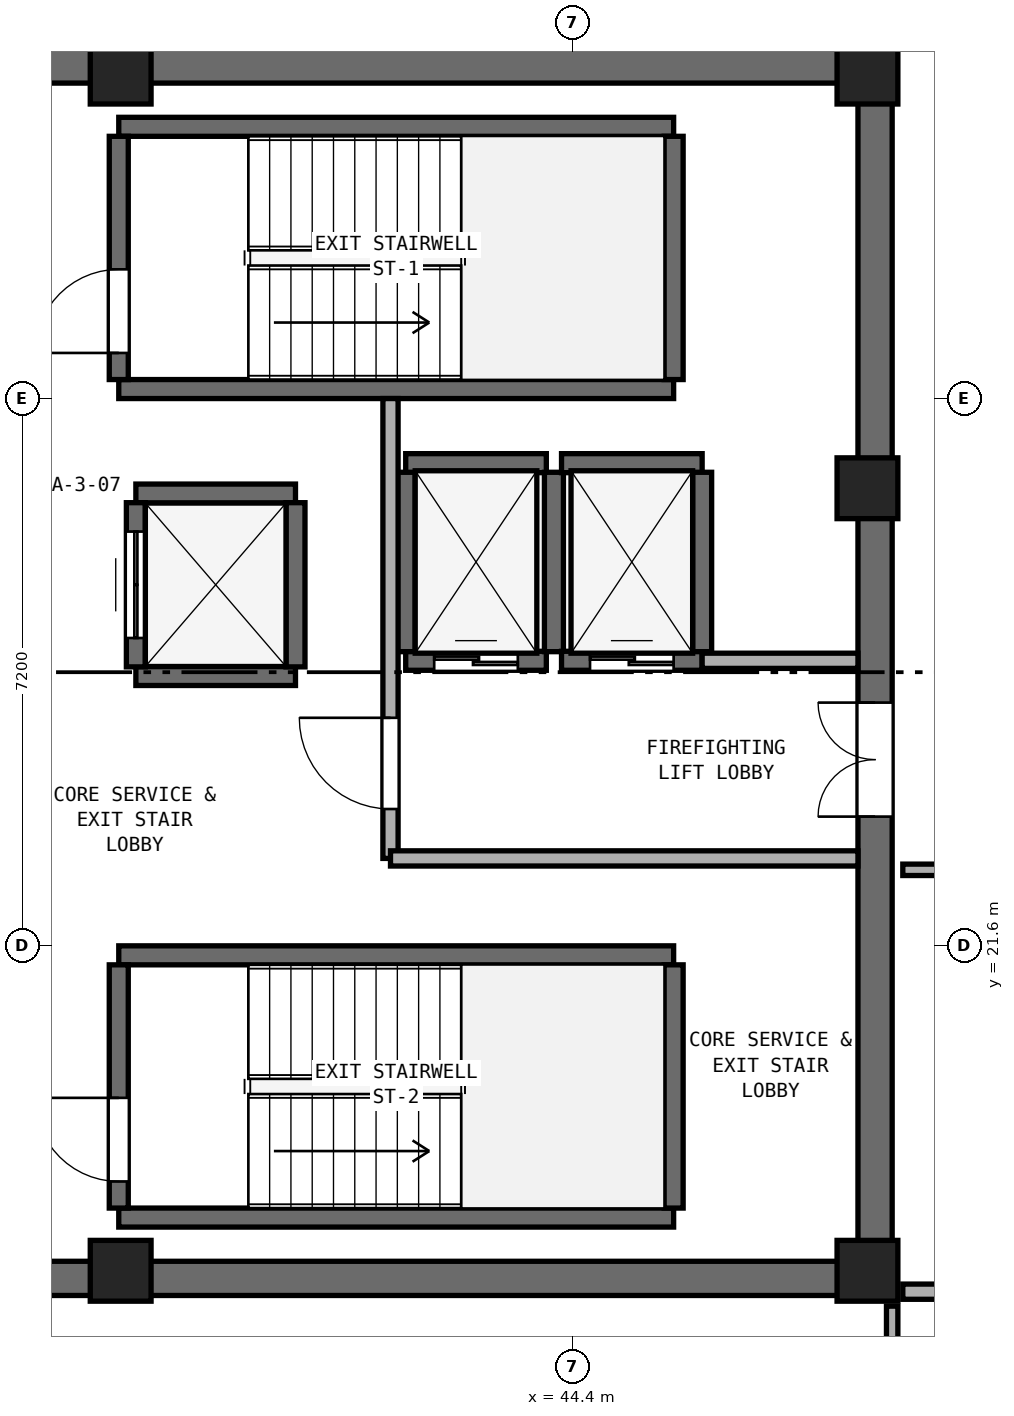
"""IFC4 building model, lengths in metres.
Left out: names, types, materials, properties, quantities, classifications, styles, units other than length and angle.
Written with IfcOpenShell. Run it as: python <this file> out.ifc"""

import sys

from ifc_helpers import new_model, si_unit, direction, frame, frame_2d, origin, origin_2d, place, context, subcontext, project, spatial, rectangle, extrude, element, fill, save


model = new_model("IFC4")
c1 = context("Model", 3, precision=1e-05, world=origin(), true_north=direction((0.0, 1.0)))
c2 = subcontext(c1, "Body", "Model", "MODEL_VIEW")
j1 = project(units=[si_unit("LENGTHUNIT", "METRE"), si_unit("PLANEANGLEUNIT", "RADIAN")], contexts=[c1])
p1 = place(None, origin())
s1 = spatial("IfcSite", under=j1, at=p1, CompositionType="ELEMENT")
p2 = place(p1, origin())
s2 = spatial("IfcBuilding", under=s1, at=p2, CompositionType="ELEMENT")
p3 = place(p2, frame((0.0, 0.0, 240.2)))
s3 = spatial("IfcBuildingStorey", under=s2, at=p3, CompositionType="ELEMENT", Elevation=240.2)
for number, where, z_axis, x_axis in (
    (1, (25.4, 17.225, 0.0), (0.0, 0.0, 1.0), (1.0, 0.0, 0.0)),
    (2, (25.4, 33.175, 0.0), (0.0, 0.0, 1.0), (1.0, 0.0, 0.0)),
):
    element("IfcWall", number, at=place(p3, frame(where, z_axis=z_axis, x_axis=x_axis)), inside=s3, PredefinedType="SHEAR", context=c2, shape_type="SweptSolid", body=[
        extrude(rectangle(XDim=23.2, YDim=0.45, at=frame_2d((11.6, 0.0))), origin(), (0.0, 0.0, 1.0), 3.51),
    ])
p4 = place(p3, frame((48.375, 17.45, 0.0), z_axis=(0.0, 0.0, 1.0), x_axis=(0.0, 1.0, 0.0)))
e3 = element("IfcWall", 3, at=p4, inside=s3, PredefinedType="SHEAR", context=c2, shape_type="SweptSolid", body=[
    extrude(rectangle(XDim=15.5, YDim=0.45, at=frame_2d((7.75, 0.0))), origin(), (0.0, 0.0, 1.0), 3.51),
])
p5 = place(p4, frame((5.85, 0.0, 0.0)))
e4 = element("IfcOpeningElement", 4, at=p5, cuts=e3, PredefinedType="OPENING", context=c2, shape_type="SweptSolid", body=[
    extrude(rectangle(XDim=1.5, YDim=2.15, at=frame_2d((0.75, 1.075))), frame((0.0, 0.235, 0.0), z_axis=(0.0, -1.0, 0.0), x_axis=(1.0, 0.0, 0.0)), (0.0, 0.0, 1.0), 0.47),
])
for number, where, z_axis, x_axis in (
    (5, (38.45, 17.325, 0.0), (0.0, 0.0, 1.0), (1.0, 0.0, 0.0)),
    (6, (48.275, 17.325, 0.0), (0.0, 0.0, 1.0), (1.0, 0.0, 0.0)),
    (7, (48.275, 27.62, 0.0), (0.0, 0.0, 1.0), (1.0, 0.0, 0.0)),
    (8, (48.275, 33.075, 0.0), (0.0, 0.0, 1.0), (1.0, 0.0, 0.0)),
    (9, (38.45, 33.075, 0.0), (0.0, 0.0, 1.0), (1.0, 0.0, 0.0)),
):
    element("IfcColumn", number, at=place(p3, frame(where, z_axis=z_axis, x_axis=x_axis)), inside=s3, PredefinedType="PILASTER", context=c2, shape_type="SweptSolid", body=[
        extrude(rectangle(XDim=0.8, YDim=0.8, at=origin_2d()), origin(), (0.0, 0.0, 1.0), 3.8),
    ])
for number, where, z_axis, x_axis in (
    (10, (38.425, 28.925, 0.0), (0.0, 0.0, 1.0), (1.0, 0.0, 0.0)),
    (11, (38.425, 32.375, 0.0), (0.0, 0.0, 1.0), (1.0, 0.0, 0.0)),
):
    element("IfcWall", number, at=place(p3, frame(where, z_axis=z_axis, x_axis=x_axis)), inside=s3, PredefinedType="SHEAR", context=c2, shape_type="SweptSolid", body=[
        extrude(rectangle(XDim=7.3, YDim=0.25, at=frame_2d((3.65, 0.0))), origin(), (0.0, 0.0, 1.0), 3.51),
    ])
p6 = place(p3, frame((38.425, 29.05, 0.0), z_axis=(0.0, 0.0, 1.0), x_axis=(0.0, 1.0, 0.0)))
e12 = element("IfcWall", 12, at=p6, inside=s3, PredefinedType="SHEAR", context=c2, shape_type="SweptSolid", body=[
    extrude(rectangle(XDim=3.2, YDim=0.25, at=frame_2d((1.6, 0.0))), origin(), (0.0, 0.0, 1.0), 3.51),
])
p7 = place(p6, frame((0.35, 0.0, 0.0)))
e13 = element("IfcOpeningElement", 13, at=p7, cuts=e12, PredefinedType="OPENING", context=c2, shape_type="SweptSolid", body=[
    extrude(rectangle(XDim=1.1, YDim=2.15, at=frame_2d((0.55, 1.075))), frame((0.0, 0.135, 0.0), z_axis=(0.0, -1.0, 0.0), x_axis=(1.0, 0.0, 0.0)), (0.0, 0.0, 1.0), 0.27),
])
p8 = place(p3, frame((45.725, 29.05, 0.0), z_axis=(0.0, 0.0, 1.0), x_axis=(0.0, 1.0, 0.0)))
e14 = element("IfcWall", 14, at=p8, inside=s3, PredefinedType="SHEAR", context=c2, shape_type="SweptSolid", body=[
    extrude(rectangle(XDim=3.2, YDim=0.25, at=frame_2d((1.6, 0.0))), origin(), (0.0, 0.0, 1.0), 3.51),
])
for number, where, z_axis, x_axis in (
    (15, (38.425, 18.025, 0.0), (0.0, 0.0, 1.0), (1.0, 0.0, 0.0)),
    (16, (38.425, 21.475, 0.0), (0.0, 0.0, 1.0), (1.0, 0.0, 0.0)),
):
    element("IfcWall", number, at=place(p3, frame(where, z_axis=z_axis, x_axis=x_axis)), inside=s3, PredefinedType="SHEAR", context=c2, shape_type="SweptSolid", body=[
        extrude(rectangle(XDim=7.3, YDim=0.25, at=frame_2d((3.65, 0.0))), origin(), (0.0, 0.0, 1.0), 3.51),
    ])
p9 = place(p3, frame((38.425, 18.15, 0.0), z_axis=(0.0, 0.0, 1.0), x_axis=(0.0, 1.0, 0.0)))
e17 = element("IfcWall", 17, at=p9, inside=s3, PredefinedType="SHEAR", context=c2, shape_type="SweptSolid", body=[
    extrude(rectangle(XDim=3.2, YDim=0.25, at=frame_2d((1.6, 0.0))), origin(), (0.0, 0.0, 1.0), 3.51),
])
p10 = place(p9, frame((0.35, 0.0, 0.0)))
e18 = element("IfcOpeningElement", 18, at=p10, cuts=e17, PredefinedType="OPENING", context=c2, shape_type="SweptSolid", body=[
    extrude(rectangle(XDim=1.1, YDim=2.15, at=frame_2d((0.55, 1.075))), frame((0.0, 0.135, 0.0), z_axis=(0.0, -1.0, 0.0), x_axis=(1.0, 0.0, 0.0)), (0.0, 0.0, 1.0), 0.27),
])
p11 = place(p3, frame((45.725, 18.15, 0.0), z_axis=(0.0, 0.0, 1.0), x_axis=(0.0, 1.0, 0.0)))
e19 = element("IfcWall", 19, at=p11, inside=s3, PredefinedType="SHEAR", context=c2, shape_type="SweptSolid", body=[
    extrude(rectangle(XDim=3.2, YDim=0.25, at=frame_2d((1.6, 0.0))), origin(), (0.0, 0.0, 1.0), 3.51),
])
p12 = place(p3, frame((42.2, 25.35, 0.0), z_axis=(0.0, 0.0, 1.0), x_axis=(1.0, 0.0, 0.0)))
e20 = element("IfcWall", 20, at=p12, inside=s3, PredefinedType="SHEAR", context=c2, shape_type="SweptSolid", body=[
    extrude(rectangle(XDim=1.85, YDim=0.25, at=frame_2d((0.925, 0.0))), origin(), (0.0, 0.0, 1.0), 3.51),
])
p13 = place(p12, frame((0.375, 0.0, 0.0)))
e21 = element("IfcOpeningElement", 21, at=p13, cuts=e20, PredefinedType="OPENING", context=c2, shape_type="SweptSolid", body=[
    extrude(rectangle(XDim=1.1, YDim=2.15, at=frame_2d((0.55, 1.075))), frame((0.0, 0.135, 0.0), z_axis=(0.0, -1.0, 0.0), x_axis=(1.0, 0.0, 0.0)), (0.0, 0.0, 1.0), 0.27),
])
p14 = place(p3, frame((42.2, 27.95, 0.0), z_axis=(0.0, 0.0, 1.0), x_axis=(1.0, 0.0, 0.0)))
e22 = element("IfcWall", 22, at=p14, inside=s3, PredefinedType="SHEAR", context=c2, shape_type="SweptSolid", body=[
    extrude(rectangle(XDim=1.85, YDim=0.25, at=frame_2d((0.925, 0.0))), origin(), (0.0, 0.0, 1.0), 3.51),
])
for number, where, z_axis, x_axis in (
    (23, (42.2, 25.47, 0.0), (0.0, 0.0, 1.0), (0.0, 1.0, 0.0)),
    (24, (44.15, 25.47, 0.0), (0.0, 0.0, 1.0), (0.0, 1.0, 0.0)),
):
    element("IfcWall", number, at=place(p3, frame(where, z_axis=z_axis, x_axis=x_axis)), inside=s3, PredefinedType="SHEAR", context=c2, shape_type="SweptSolid", body=[
        extrude(rectangle(XDim=2.36, YDim=0.25, at=frame_2d((1.18, 0.0))), origin(), (0.0, 0.0, 1.0), 3.51),
    ])
p15 = place(p3, frame((44.25, 25.35, 0.0), z_axis=(0.0, 0.0, 1.0), x_axis=(1.0, 0.0, 0.0)))
e25 = element("IfcWall", 25, at=p15, inside=s3, PredefinedType="SHEAR", context=c2, shape_type="SweptSolid", body=[
    extrude(rectangle(XDim=1.85, YDim=0.25, at=frame_2d((0.925, 0.0))), origin(), (0.0, 0.0, 1.0), 3.51),
])
p16 = place(p15, frame((0.375, 0.0, 0.0)))
e26 = element("IfcOpeningElement", 26, at=p16, cuts=e25, PredefinedType="OPENING", context=c2, shape_type="SweptSolid", body=[
    extrude(rectangle(XDim=1.1, YDim=2.15, at=frame_2d((0.55, 1.075))), frame((0.0, 0.135, 0.0), z_axis=(0.0, -1.0, 0.0), x_axis=(1.0, 0.0, 0.0)), (0.0, 0.0, 1.0), 0.27),
])
p17 = place(p3, frame((44.25, 27.95, 0.0), z_axis=(0.0, 0.0, 1.0), x_axis=(1.0, 0.0, 0.0)))
e27 = element("IfcWall", 27, at=p17, inside=s3, PredefinedType="SHEAR", context=c2, shape_type="SweptSolid", body=[
    extrude(rectangle(XDim=1.85, YDim=0.25, at=frame_2d((0.925, 0.0))), origin(), (0.0, 0.0, 1.0), 3.51),
])
p18 = place(p3, frame((46.1, 25.47, 0.0), z_axis=(0.0, 0.0, 1.0), x_axis=(0.0, 1.0, 0.0)))
e28 = element("IfcWall", 28, at=p18, inside=s3, PredefinedType="SHEAR", context=c2, shape_type="SweptSolid", body=[
    extrude(rectangle(XDim=2.36, YDim=0.25, at=frame_2d((1.18, 0.0))), origin(), (0.0, 0.0, 1.0), 3.51),
])
for number, where, z_axis, x_axis in (
    (29, (38.65, 25.15, 0.0), (0.0, 0.0, 1.0), (1.0, 0.0, 0.0)),
    (30, (38.65, 27.55, 0.0), (0.0, 0.0, 1.0), (1.0, 0.0, 0.0)),
):
    element("IfcWall", number, at=place(p3, frame(where, z_axis=z_axis, x_axis=x_axis)), inside=s3, PredefinedType="SHEAR", context=c2, shape_type="SweptSolid", body=[
        extrude(rectangle(XDim=2.1, YDim=0.25, at=frame_2d((1.05, 0.0))), origin(), (0.0, 0.0, 1.0), 3.51),
    ])
p19 = place(p3, frame((38.65, 25.27, 0.0), z_axis=(0.0, 0.0, 1.0), x_axis=(0.0, 1.0, 0.0)))
e31 = element("IfcWall", 31, at=p19, inside=s3, PredefinedType="SHEAR", context=c2, shape_type="SweptSolid", body=[
    extrude(rectangle(XDim=2.16, YDim=0.25, at=frame_2d((1.08, 0.0))), origin(), (0.0, 0.0, 1.0), 3.51),
])
p20 = place(p19, frame((0.38, 0.0, 0.0)))
e32 = element("IfcOpeningElement", 32, at=p20, cuts=e31, PredefinedType="OPENING", context=c2, shape_type="SweptSolid", body=[
    extrude(rectangle(XDim=1.4, YDim=2.2, at=frame_2d((0.7, 1.1))), frame((0.0, 0.135, 0.0), z_axis=(0.0, -1.0, 0.0), x_axis=(1.0, 0.0, 0.0)), (0.0, 0.0, 1.0), 0.27),
])
p21 = place(p3, frame((40.75, 25.27, 0.0), z_axis=(0.0, 0.0, 1.0), x_axis=(0.0, 1.0, 0.0)))
e33 = element("IfcWall", 33, at=p21, inside=s3, PredefinedType="SHEAR", context=c2, shape_type="SweptSolid", body=[
    extrude(rectangle(XDim=2.16, YDim=0.25, at=frame_2d((1.08, 0.0))), origin(), (0.0, 0.0, 1.0), 3.51),
])
p22 = place(p3, frame((42.0, 22.75, 0.0), z_axis=(0.0, 0.0, 1.0), x_axis=(0.0, 1.0, 0.0)))
e34 = element("IfcWall", 34, at=p22, inside=s3, PredefinedType="SOLIDWALL", context=c2, shape_type="SweptSolid", body=[
    extrude(rectangle(XDim=6.05, YDim=0.2, at=frame_2d((3.025, 0.0))), origin(), (0.0, 0.0, 1.0), 3.51),
])
p23 = place(p22, frame((0.65, 0.0, 0.0)))
e35 = element("IfcOpeningElement", 35, at=p23, cuts=e34, PredefinedType="OPENING", context=c2, shape_type="SweptSolid", body=[
    extrude(rectangle(XDim=1.2, YDim=2.15, at=frame_2d((0.6, 1.075))), frame((0.0, 0.11, 0.0), z_axis=(0.0, -1.0, 0.0), x_axis=(1.0, 0.0, 0.0)), (0.0, 0.0, 1.0), 0.22),
])
p24 = place(p3, frame((42.0, 22.75, 0.0), z_axis=(0.0, 0.0, 1.0), x_axis=(1.0, 0.0, 0.0)))
e36 = element("IfcWall", 36, at=p24, inside=s3, PredefinedType="SOLIDWALL", context=c2, shape_type="SweptSolid", body=[
    extrude(rectangle(XDim=6.15, YDim=0.2, at=frame_2d((3.075, 0.0))), origin(), (0.0, 0.0, 1.0), 3.51),
])
p25 = place(p3, frame((46.1, 25.35, 0.0), z_axis=(0.0, 0.0, 1.0), x_axis=(1.0, 0.0, 0.0)))
e37 = element("IfcWall", 37, at=p25, inside=s3, PredefinedType="SOLIDWALL", context=c2, shape_type="SweptSolid", body=[
    extrude(rectangle(XDim=2.05, YDim=0.2, at=frame_2d((1.025, 0.0))), origin(), (0.0, 0.0, 1.0), 3.51),
])
p26 = place(p3, frame((48.6, 14.85, 0.0), z_axis=(0.0, 0.0, 1.0), x_axis=(0.0, 1.0, 0.0)))
e38 = element("IfcWall", 38, at=p26, inside=s3, PredefinedType="PARTITIONING", context=c2, shape_type="SweptSolid", body=[
    extrude(rectangle(XDim=2.01, YDim=0.15, at=frame_2d((1.005, 0.0))), origin(), (0.0, 0.0, 1.0), 2.893),
])
p27 = place(p3, frame((48.74, 17.05, 0.0), z_axis=(0.0, 0.0, 1.0), x_axis=(1.0, 0.0, 0.0)))
e39 = element("IfcWall", 39, at=p27, inside=s3, PredefinedType="PARTITIONING", context=c2, shape_type="SweptSolid", body=[
    extrude(rectangle(XDim=16.555, YDim=0.2, at=frame_2d((8.277, 0.0))), origin(), (0.0, 0.0, 1.0), 2.893),
])
p28 = place(p3, frame((48.74, 22.6, 0.0), z_axis=(0.0, 0.0, 1.0), x_axis=(1.0, 0.0, 0.0)))
e40 = element("IfcWall", 40, at=p28, inside=s3, PredefinedType="PARTITIONING", context=c2, shape_type="SweptSolid", body=[
    extrude(rectangle(XDim=2.01, YDim=0.15, at=frame_2d((1.005, 0.0))), origin(), (0.0, 0.0, 1.0), 3.51),
])
p29 = place(p7, origin())
e41 = element("IfcDoor", 41, at=p29, inside=s3, OperationType="SINGLE_SWING_LEFT", PredefinedType="DOOR", context=c2, shape_type="SweptSolid", body=[
    extrude(rectangle(XDim=1.1, YDim=2.15, at=frame_2d((0.55, 1.075))), frame((0.0, 0.025, 0.0), z_axis=(0.0, -1.0, 0.0), x_axis=(1.0, 0.0, 0.0)), (0.0, 0.0, 1.0), 0.05),
])
fill(e13, e41)
p30 = place(p10, origin())
e42 = element("IfcDoor", 42, at=p30, inside=s3, OperationType="SINGLE_SWING_RIGHT", PredefinedType="DOOR", context=c2, shape_type="SweptSolid", body=[
    extrude(rectangle(XDim=1.1, YDim=2.15, at=frame_2d((0.55, 1.075))), frame((0.0, 0.025, 0.0), z_axis=(0.0, -1.0, 0.0), x_axis=(1.0, 0.0, 0.0)), (0.0, 0.0, 1.0), 0.05),
])
fill(e18, e42)
p31 = place(p13, origin())
e43 = element("IfcDoor", 43, at=p31, inside=s3, OperationType="DOUBLE_DOOR_SLIDING", PredefinedType="DOOR", context=c2, shape_type="SweptSolid", body=[
    extrude(rectangle(XDim=1.1, YDim=2.15, at=frame_2d((0.55, 1.075))), frame((0.0, 0.025, 0.0), z_axis=(0.0, -1.0, 0.0), x_axis=(1.0, 0.0, 0.0)), (0.0, 0.0, 1.0), 0.05),
])
fill(e21, e43)
p32 = place(p16, origin())
e44 = element("IfcDoor", 44, at=p32, inside=s3, OperationType="DOUBLE_DOOR_SLIDING", PredefinedType="DOOR", context=c2, shape_type="SweptSolid", body=[
    extrude(rectangle(XDim=1.1, YDim=2.15, at=frame_2d((0.55, 1.075))), frame((0.0, 0.025, 0.0), z_axis=(0.0, -1.0, 0.0), x_axis=(1.0, 0.0, 0.0)), (0.0, 0.0, 1.0), 0.05),
])
fill(e26, e44)
p33 = place(p20, origin())
e45 = element("IfcDoor", 45, at=p33, inside=s3, OperationType="DOUBLE_DOOR_SLIDING", PredefinedType="DOOR", context=c2, shape_type="SweptSolid", body=[
    extrude(rectangle(XDim=1.4, YDim=2.2, at=frame_2d((0.7, 1.1))), frame((0.0, 0.025, 0.0), z_axis=(0.0, -1.0, 0.0), x_axis=(1.0, 0.0, 0.0)), (0.0, 0.0, 1.0), 0.05),
])
fill(e32, e45)
p34 = place(p23, origin())
e46 = element("IfcDoor", 46, at=p34, inside=s3, OperationType="SINGLE_SWING_RIGHT", PredefinedType="DOOR", context=c2, shape_type="SweptSolid", body=[
    extrude(rectangle(XDim=1.2, YDim=2.15, at=frame_2d((0.6, 1.075))), frame((0.0, 0.025, 0.0), z_axis=(0.0, -1.0, 0.0), x_axis=(1.0, 0.0, 0.0)), (0.0, 0.0, 1.0), 0.05),
])
fill(e35, e46)
p35 = place(p5, origin())
e47 = element("IfcDoor", 47, at=p35, inside=s3, OperationType="DOUBLE_DOOR_SINGLE_SWING", PredefinedType="DOOR", context=c2, shape_type="SweptSolid", body=[
    extrude(rectangle(XDim=1.5, YDim=2.15, at=frame_2d((0.75, 1.075))), frame((0.0, 0.025, 0.0), z_axis=(0.0, -1.0, 0.0), x_axis=(1.0, 0.0, 0.0)), (0.0, 0.0, 1.0), 0.05),
])
fill(e4, e47)
save(model, sys.argv[1])
